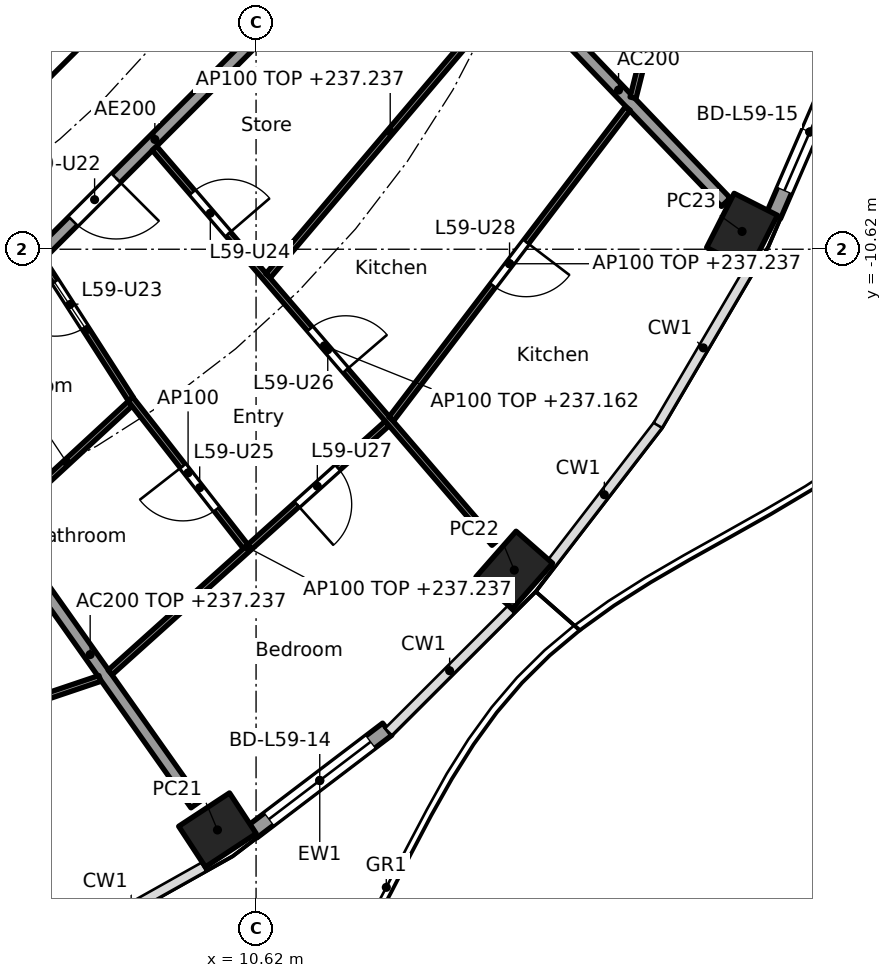
"""IFC4 building model, lengths in metres.
Left out: names, types, materials, properties, quantities, classifications, styles, units other than length and angle.
Written with IfcOpenShell. Run it as: python <this file> out.ifc"""

import sys

from ifc_helpers import new_model, si_unit, direction, frame, frame_2d, origin, origin_2d, place, context, subcontext, project, spatial, rectangle, hollow_rectangle, extrude, element, fill, save


model = new_model("IFC4")
c1 = context("Model", 3, precision=1e-05, world=origin(), true_north=direction((0.0, 1.0)))
c2 = subcontext(c1, "Body", "Model", "MODEL_VIEW")
j1 = project(units=[si_unit("LENGTHUNIT", "METRE"), si_unit("PLANEANGLEUNIT", "RADIAN")], contexts=[c1])
p1 = place(None, origin())
s1 = spatial("IfcSite", under=j1, at=p1, CompositionType="ELEMENT")
p2 = place(p1, origin())
s2 = spatial("IfcBuilding", under=s1, at=p2, CompositionType="ELEMENT")
p3 = place(p2, frame((0.0, 0.0, 234.4)))
s3 = spatial("IfcBuildingStorey", under=s2, at=p3, CompositionType="ELEMENT", Elevation=234.4)
for number, where, z_axis, x_axis in (
    (1, (9.985, -20.17, 0.0), (0.0, 0.0, 1.0), (0.836, 0.549, 0.0)),
    (2, (14.866, -15.896, 0.0), (0.0, 0.0, 1.0), (0.66, 0.751, 0.0)),
    (3, (18.612, -10.327, 0.0), (0.0, 0.0, 1.0), (0.452, 0.892, 0.0)),
):
    element("IfcColumn", number, at=place(p3, frame(where, z_axis=z_axis, x_axis=x_axis)), inside=s3, PredefinedType="COLUMN", context=c2, shape_type="SweptSolid", body=[
        extrude(hollow_rectangle(XDim=1.0, YDim=0.8, WallThickness=0.032, at=origin_2d()), origin(), (0.0, 0.0, 1.0), 3.7),
    ])
p4 = place(p3, frame((12.777, -18.513, 0.0), z_axis=(0.0, 0.0, 1.0), x_axis=(-0.796022158395, -0.605267480825, 0.0)))
e4 = element("IfcWall", 4, at=p4, inside=s3, PredefinedType="SOLIDWALL", context=c2, shape_type="SweptSolid", body=[
    extrude(rectangle(XDim=2.789, YDim=0.25, at=frame_2d((1.395, 0.0))), origin(), (0.0, 0.0, 1.0), 3.44),
])
p5 = place(p4, frame((0.344, 0.0, 0.0)))
e5 = element("IfcOpeningElement", 5, at=p5, cuts=e4, PredefinedType="OPENING", context=c2, shape_type="SweptSolid", body=[
    extrude(rectangle(XDim=2.1, YDim=2.4, at=frame_2d((1.05, 1.2))), frame((0.0, 0.135, 0.0), z_axis=(0.0, -1.0, 0.0), x_axis=(1.0, 0.0, 0.0)), (0.0, 0.0, 1.0), 0.27),
])
p6 = place(p3, frame((20.323, -7.314, 0.0), z_axis=(0.0, 0.0, 1.0), x_axis=(-0.397586897646, -0.917564525698, 0.0)))
e6 = element("IfcWall", 6, at=p6, inside=s3, PredefinedType="SOLIDWALL", context=c2, shape_type="SweptSolid", body=[
    extrude(rectangle(XDim=3.002, YDim=0.25, at=frame_2d((1.501, 0.0))), origin(), (0.0, 0.0, 1.0), 3.44),
])
p7 = place(p6, frame((0.451, 0.0, 0.0)))
e7 = element("IfcOpeningElement", 7, at=p7, cuts=e6, PredefinedType="OPENING", context=c2, shape_type="SweptSolid", body=[
    extrude(rectangle(XDim=2.1, YDim=2.4, at=frame_2d((1.05, 1.2))), frame((0.0, 0.135, 0.0), z_axis=(0.0, -1.0, 0.0), x_axis=(1.0, 0.0, 0.0)), (0.0, 0.0, 1.0), 0.27),
])
p8 = place(p3, frame((4.613, -9.988, 0.0), z_axis=(0.0, 0.0, 1.0), x_axis=(0.707106781187, 0.707106781187, 0.0)))
e8 = element("IfcWall", 8, at=p8, inside=s3, PredefinedType="SHEAR", context=c2, shape_type="SweptSolid", body=[
    extrude(rectangle(XDim=7.602, YDim=0.6, at=frame_2d((3.801, 0.0))), origin(), (0.0, 0.0, 1.0), 3.44),
])
p9 = place(p8, frame((3.201, 0.0, 0.0)))
e9 = element("IfcOpeningElement", 9, at=p9, cuts=e8, PredefinedType="OPENING", context=c2, shape_type="SweptSolid", body=[
    extrude(rectangle(XDim=1.2, YDim=2.1, at=frame_2d((0.6, 1.05))), frame((0.0, 0.31, 0.0), z_axis=(0.0, -1.0, 0.0), x_axis=(1.0, 0.0, 0.0)), (0.0, 0.0, 1.0), 0.62),
])
p10 = place(p3, frame((6.152, -14.823, 0.0), z_axis=(0.0, 0.0, 1.0), x_axis=(0.576994695158, -0.816747893637, 0.0)))
e10 = element("IfcWall", 10, at=p10, inside=s3, PredefinedType="PARTITIONING", context=c2, shape_type="SweptSolid", body=[
    extrude(rectangle(XDim=6.03, YDim=0.2, at=frame_2d((3.015, 0.0))), origin(), (0.0, 0.0, 1.0), 2.837),
])
p11 = place(p3, frame((14.817, -6.159, 0.0), z_axis=(0.0, 0.0, 1.0), x_axis=(0.691437669875, -0.722436120828, 0.0)))
e11 = element("IfcWall", 11, at=p11, inside=s3, PredefinedType="PARTITIONING", context=c2, shape_type="SweptSolid", body=[
    extrude(rectangle(XDim=5.104, YDim=0.2, at=frame_2d((2.552, 0.0))), origin(), (0.0, 0.0, 1.0), 3.44),
])
p12 = place(p3, frame((5.275, -12.494, 0.0), z_axis=(0.0, 0.0, 1.0), x_axis=(0.707106781187, 0.707106781187, 0.0)))
e12 = element("IfcWall", 12, at=p12, inside=s3, PredefinedType="PARTITIONING", context=c2, shape_type="SweptSolid", body=[
    extrude(rectangle(XDim=10.409, YDim=0.2, at=frame_2d((5.205, 0.0))), origin(), (0.0, 0.0, 1.0), 3.44),
])
p13 = place(p12, frame((3.303, 0.0, 0.0)))
e13 = element("IfcOpeningElement", 13, at=p13, cuts=e12, PredefinedType="OPENING", context=c2, shape_type="SweptSolid", body=[
    extrude(rectangle(XDim=1.0, YDim=2.1, at=frame_2d((0.5, 1.05))), frame((0.0, 0.11, 0.0), z_axis=(0.0, -1.0, 0.0), x_axis=(1.0, 0.0, 0.0)), (0.0, 0.0, 1.0), 0.22),
])
p14 = place(p3, frame((3.453, -19.229, 0.0), z_axis=(0.0, 0.0, 1.0), x_axis=(0.947565610716, 0.31956128268, 0.0)))
e14 = element("IfcWall", 14, at=p14, inside=s3, PredefinedType="PARTITIONING", context=c2, shape_type="SweptSolid", body=[
    extrude(rectangle(XDim=4.853, YDim=0.1, at=frame_2d((2.426, 0.0))), origin(), (0.0, 0.0, 1.0), 2.837),
])
p15 = place(p14, frame((1.976, 0.0, 0.0)))
e15 = element("IfcOpeningElement", 15, at=p15, cuts=e14, PredefinedType="OPENING", context=c2, shape_type="SweptSolid", body=[
    extrude(rectangle(XDim=0.9, YDim=2.1, at=frame_2d((0.45, 1.05))), frame((0.0, 0.06, 0.0), z_axis=(0.0, -1.0, 0.0), x_axis=(1.0, 0.0, 0.0)), (0.0, 0.0, 1.0), 0.12),
])
p16 = place(p3, frame((6.461, -15.088, 0.0), z_axis=(0.0, 0.0, 1.0), x_axis=(0.734625662691, 0.678472649203, 0.0)))
e16 = element("IfcWall", 16, at=p16, inside=s3, PredefinedType="PARTITIONING", context=c2, shape_type="SweptSolid", body=[
    extrude(rectangle(XDim=2.844, YDim=0.1, at=frame_2d((1.422, 0.0))), origin(), (0.0, 0.0, 1.0), 2.837),
])
p17 = place(p3, frame((8.22, -17.579, 0.0), z_axis=(0.0, 0.0, 1.0), x_axis=(0.743696370895, 0.668517544958, 0.0)))
e17 = element("IfcWall", 17, at=p17, inside=s3, PredefinedType="PARTITIONING", context=c2, shape_type="SweptSolid", body=[
    extrude(rectangle(XDim=6.125, YDim=0.1, at=frame_2d((3.062, 0.0))), origin(), (0.0, 0.0, 1.0), 2.837),
])
p18 = place(p17, frame((4.131, 0.0, 0.0)))
e18 = element("IfcOpeningElement", 18, at=p18, cuts=e17, PredefinedType="OPENING", context=c2, shape_type="SweptSolid", body=[
    extrude(rectangle(XDim=0.9, YDim=2.1, at=frame_2d((0.45, 1.05))), frame((0.0, 0.06, 0.0), z_axis=(0.0, -1.0, 0.0), x_axis=(1.0, 0.0, 0.0)), (0.0, 0.0, 1.0), 0.12),
])
p19 = place(p3, frame((7.099, -10.809, 0.0), z_axis=(0.0, 0.0, 1.0), x_axis=(0.540424285965, -0.841392649801, 0.0)))
e19 = element("IfcWall", 19, at=p19, inside=s3, PredefinedType="PARTITIONING", context=c2, shape_type="SweptSolid", body=[
    extrude(rectangle(XDim=2.703, YDim=0.1, at=frame_2d((1.352, 0.0))), origin(), (0.0, 0.0, 1.0), 2.762),
])
p20 = place(p19, frame((0.405, 0.0, 0.0)))
e20 = element("IfcOpeningElement", 20, at=p20, cuts=e19, PredefinedType="OPENING", context=c2, shape_type="SweptSolid", body=[
    extrude(rectangle(XDim=0.9, YDim=2.1, at=frame_2d((0.45, 1.05))), frame((0.0, 0.06, 0.0), z_axis=(0.0, -1.0, 0.0), x_axis=(1.0, 0.0, 0.0)), (0.0, 0.0, 1.0), 0.12),
])
p21 = place(p3, frame((8.555, -13.086, 0.0), z_axis=(0.0, 0.0, 1.0), x_axis=(0.61562093425, -0.788042426087, 0.0)))
e21 = element("IfcWall", 21, at=p21, inside=s3, PredefinedType="PARTITIONING", context=c2, shape_type="SweptSolid", body=[
    extrude(rectangle(XDim=3.075, YDim=0.1, at=frame_2d((1.538, 0.0))), origin(), (0.0, 0.0, 1.0), 3.44),
])
p22 = place(p21, frame((1.398, 0.0, 0.0)))
e22 = element("IfcOpeningElement", 22, at=p22, cuts=e21, PredefinedType="OPENING", context=c2, shape_type="SweptSolid", body=[
    extrude(rectangle(XDim=0.9, YDim=2.1, at=frame_2d((0.45, 1.05))), frame((0.0, 0.06, 0.0), z_axis=(0.0, -1.0, 0.0), x_axis=(1.0, 0.0, 0.0)), (0.0, 0.0, 1.0), 0.12),
])
p23 = place(p3, frame((8.95, -8.96, 0.0), z_axis=(0.0, 0.0, 1.0), x_axis=(0.652102165991, -0.758131100213, 0.0)))
e23 = element("IfcWall", 23, at=p23, inside=s3, PredefinedType="PARTITIONING", context=c2, shape_type="SweptSolid", body=[
    extrude(rectangle(XDim=8.568, YDim=0.1, at=frame_2d((4.284, 0.0))), origin(), (0.0, 0.0, 1.0), 2.762),
])
p24 = place(p23, frame((0.957, 0.0, 0.0)))
e24 = element("IfcOpeningElement", 24, at=p24, cuts=e23, PredefinedType="OPENING", context=c2, shape_type="SweptSolid", body=[
    extrude(rectangle(XDim=0.9, YDim=2.1, at=frame_2d((0.45, 1.05))), frame((0.0, 0.06, 0.0), z_axis=(0.0, -1.0, 0.0), x_axis=(1.0, 0.0, 0.0)), (0.0, 0.0, 1.0), 0.12),
])
p25 = place(p23, frame((3.919, 0.0, 0.0)))
e25 = element("IfcOpeningElement", 25, at=p25, cuts=e23, PredefinedType="OPENING", context=c2, shape_type="SweptSolid", body=[
    extrude(rectangle(XDim=0.9, YDim=2.1, at=frame_2d((0.45, 1.05))), frame((0.0, 0.06, 0.0), z_axis=(0.0, -1.0, 0.0), x_axis=(1.0, 0.0, 0.0)), (0.0, 0.0, 1.0), 0.12),
])
p26 = place(p3, frame((10.818, -11.056, 0.0), z_axis=(0.0, 0.0, 1.0), x_axis=(0.646981604878, 0.762505608471, 0.0)))
e26 = element("IfcWall", 26, at=p26, inside=s3, PredefinedType="PARTITIONING", context=c2, shape_type="SweptSolid", body=[
    extrude(rectangle(XDim=6.209, YDim=0.1, at=frame_2d((3.104, 0.0))), origin(), (0.0, 0.0, 1.0), 2.837),
])
p27 = place(p3, frame((12.843, -13.411, 0.0), z_axis=(0.0, 0.0, 1.0), x_axis=(0.606128002625, 0.795367112995, 0.0)))
e27 = element("IfcWall", 27, at=p27, inside=s3, PredefinedType="PARTITIONING", context=c2, shape_type="SweptSolid", body=[
    extrude(rectangle(XDim=6.42, YDim=0.1, at=frame_2d((3.21, 0.0))), origin(), (0.0, 0.0, 1.0), 2.837),
])
p28 = place(p27, frame((2.76, 0.0, 0.0)))
e28 = element("IfcOpeningElement", 28, at=p28, cuts=e27, PredefinedType="OPENING", context=c2, shape_type="SweptSolid", body=[
    extrude(rectangle(XDim=0.9, YDim=2.1, at=frame_2d((0.45, 1.05))), frame((0.0, 0.06, 0.0), z_axis=(0.0, -1.0, 0.0), x_axis=(1.0, 0.0, 0.0)), (0.0, 0.0, 1.0), 0.12),
])
p29 = place(p3, frame((16.819, -8.129, 0.0), z_axis=(0.0, 0.0, 1.0), x_axis=(0.243041266705, 0.970015949703, 0.0)))
e29 = element("IfcWall", 29, at=p29, inside=s3, PredefinedType="PARTITIONING", context=c2, shape_type="SweptSolid", body=[
    extrude(rectangle(XDim=5.112, YDim=0.1, at=frame_2d((2.556, 0.0))), origin(), (0.0, 0.0, 1.0), 2.837),
])
p30 = place(p5, origin())
e30 = element("IfcDoor", 30, at=p30, inside=s3, OperationType="SLIDING_TO_LEFT", PredefinedType="DOOR", context=c2, shape_type="SweptSolid", body=[
    extrude(rectangle(XDim=2.1, YDim=2.4, at=frame_2d((1.05, 1.2))), frame((0.0, 0.025, 0.0), z_axis=(0.0, -1.0, 0.0), x_axis=(1.0, 0.0, 0.0)), (0.0, 0.0, 1.0), 0.05),
])
fill(e5, e30)
p31 = place(p7, origin())
e31 = element("IfcDoor", 31, at=p31, inside=s3, OperationType="SLIDING_TO_LEFT", PredefinedType="DOOR", context=c2, shape_type="SweptSolid", body=[
    extrude(rectangle(XDim=2.1, YDim=2.4, at=frame_2d((1.05, 1.2))), frame((0.0, 0.025, 0.0), z_axis=(0.0, -1.0, 0.0), x_axis=(1.0, 0.0, 0.0)), (0.0, 0.0, 1.0), 0.05),
])
fill(e7, e31)
p32 = place(p9, origin())
e32 = element("IfcDoor", 32, at=p32, inside=s3, OperationType="SINGLE_SWING_LEFT", PredefinedType="DOOR", context=c2, shape_type="SweptSolid", body=[
    extrude(rectangle(XDim=1.2, YDim=2.1, at=frame_2d((0.6, 1.05))), frame((0.0, 0.025, 0.0), z_axis=(0.0, -1.0, 0.0), x_axis=(1.0, 0.0, 0.0)), (0.0, 0.0, 1.0), 0.05),
])
fill(e9, e32)
p33 = place(p13, frame((1.0, 0.0, 0.0), x_axis=(-1.0, 0.0, 0.0)))
e33 = element("IfcDoor", 33, at=p33, inside=s3, OperationType="SINGLE_SWING_LEFT", PredefinedType="DOOR", context=c2, shape_type="SweptSolid", body=[
    extrude(rectangle(XDim=1.0, YDim=2.1, at=frame_2d((0.5, 1.05))), frame((0.0, 0.025, 0.0), z_axis=(0.0, -1.0, 0.0), x_axis=(1.0, 0.0, 0.0)), (0.0, 0.0, 1.0), 0.05),
])
fill(e13, e33)
p34 = place(p20, frame((0.9, 0.0, 0.0), x_axis=(-1.0, 0.0, 0.0)))
e34 = element("IfcDoor", 34, at=p34, inside=s3, OperationType="SINGLE_SWING_RIGHT", PredefinedType="DOOR", context=c2, shape_type="SweptSolid", body=[
    extrude(rectangle(XDim=0.9, YDim=2.1, at=frame_2d((0.45, 1.05))), frame((0.0, 0.025, 0.0), z_axis=(0.0, -1.0, 0.0), x_axis=(1.0, 0.0, 0.0)), (0.0, 0.0, 1.0), 0.05),
])
fill(e20, e34)
p35 = place(p24, origin())
e35 = element("IfcDoor", 35, at=p35, inside=s3, OperationType="SINGLE_SWING_RIGHT", PredefinedType="DOOR", context=c2, shape_type="SweptSolid", body=[
    extrude(rectangle(XDim=0.9, YDim=2.1, at=frame_2d((0.45, 1.05))), frame((0.0, 0.025, 0.0), z_axis=(0.0, -1.0, 0.0), x_axis=(1.0, 0.0, 0.0)), (0.0, 0.0, 1.0), 0.05),
])
fill(e24, e35)
p36 = place(p22, frame((0.9, 0.0, 0.0), x_axis=(-1.0, 0.0, 0.0)))
e36 = element("IfcDoor", 36, at=p36, inside=s3, OperationType="SINGLE_SWING_RIGHT", PredefinedType="DOOR", context=c2, shape_type="SweptSolid", body=[
    extrude(rectangle(XDim=0.9, YDim=2.1, at=frame_2d((0.45, 1.05))), frame((0.0, 0.025, 0.0), z_axis=(0.0, -1.0, 0.0), x_axis=(1.0, 0.0, 0.0)), (0.0, 0.0, 1.0), 0.05),
])
fill(e22, e36)
p37 = place(p25, origin())
e37 = element("IfcDoor", 37, at=p37, inside=s3, OperationType="SINGLE_SWING_RIGHT", PredefinedType="DOOR", context=c2, shape_type="SweptSolid", body=[
    extrude(rectangle(XDim=0.9, YDim=2.1, at=frame_2d((0.45, 1.05))), frame((0.0, 0.025, 0.0), z_axis=(0.0, -1.0, 0.0), x_axis=(1.0, 0.0, 0.0)), (0.0, 0.0, 1.0), 0.05),
])
fill(e25, e37)
p38 = place(p18, frame((0.9, 0.0, 0.0), x_axis=(-1.0, 0.0, 0.0)))
e38 = element("IfcDoor", 38, at=p38, inside=s3, OperationType="SINGLE_SWING_RIGHT", PredefinedType="DOOR", context=c2, shape_type="SweptSolid", body=[
    extrude(rectangle(XDim=0.9, YDim=2.1, at=frame_2d((0.45, 1.05))), frame((0.0, 0.025, 0.0), z_axis=(0.0, -1.0, 0.0), x_axis=(1.0, 0.0, 0.0)), (0.0, 0.0, 1.0), 0.05),
])
fill(e18, e38)
p39 = place(p28, frame((0.9, 0.0, 0.0), x_axis=(-1.0, 0.0, 0.0)))
e39 = element("IfcDoor", 39, at=p39, inside=s3, OperationType="SINGLE_SWING_LEFT", PredefinedType="DOOR", context=c2, shape_type="SweptSolid", body=[
    extrude(rectangle(XDim=0.9, YDim=2.1, at=frame_2d((0.45, 1.05))), frame((0.0, 0.025, 0.0), z_axis=(0.0, -1.0, 0.0), x_axis=(1.0, 0.0, 0.0)), (0.0, 0.0, 1.0), 0.05),
])
fill(e28, e39)
save(model, sys.argv[1])
